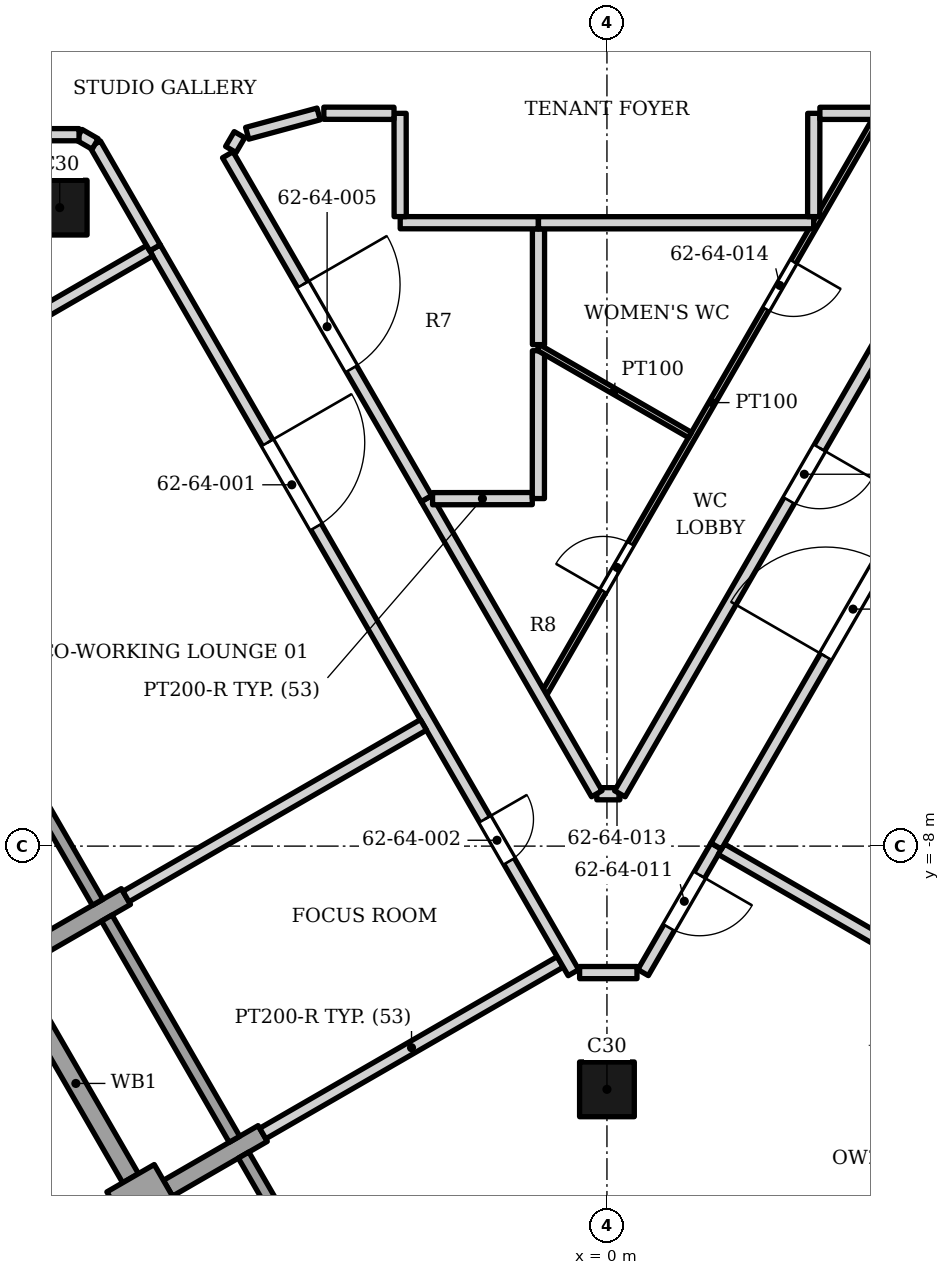
"""IFC4 building model, lengths in metres.
Left out: names, types, materials, properties, quantities, classifications, styles, units other than length and angle.
Written with IfcOpenShell. Run it as: python <this file> out.ifc"""

import sys

from ifc_helpers import new_model, si_unit, direction, frame, frame_2d, origin, origin_2d, place, context, subcontext, project, spatial, rectangle, extrude, element, fill, save


model = new_model("IFC4")
c1 = context("Model", 3, precision=1e-05, world=origin(), true_north=direction((0.0, 1.0)))
c2 = subcontext(c1, "Body", "Model", "MODEL_VIEW")
j1 = project(units=[si_unit("LENGTHUNIT", "METRE"), si_unit("PLANEANGLEUNIT", "RADIAN")], contexts=[c1])
p1 = place(None, origin())
s1 = spatial("IfcSite", under=j1, at=p1, CompositionType="ELEMENT")
p2 = place(p1, origin())
s2 = spatial("IfcBuilding", under=s1, at=p2, CompositionType="ELEMENT")
p3 = place(p2, frame((0.0, 0.0, 259.9)))
s3 = spatial("IfcBuildingStorey", under=s2, at=p3, CompositionType="ELEMENT", Elevation=259.9)
for number, where, z_axis, x_axis in (
    (1, (-9.0, 2.5, 0.0), (0.0, 0.0, 1.0), (1.0, 0.0, 0.0)),
    (2, (0.0, -12.0, 0.0), (0.0, 0.0, 1.0), (1.0, 0.0, 0.0)),
):
    element("IfcColumn", number, at=place(p3, frame(where, z_axis=z_axis, x_axis=x_axis)), inside=s3, PredefinedType="COLUMN", context=c2, shape_type="SweptSolid", body=[
        extrude(rectangle(XDim=0.9, YDim=0.9, at=origin_2d()), origin(), (0.0, 0.0, 1.0), 3.9),
    ])
p4 = place(p3, frame((-7.911, -8.829, 0.0), z_axis=(0.0, 0.0, 1.0), x_axis=(-0.866047807691, -0.499961193289, 0.0)))
e3 = element("IfcWall", 3, at=p4, inside=s3, PredefinedType="SOLIDWALL", context=c2, shape_type="SweptSolid", body=[
    extrude(rectangle(XDim=1.8, YDim=0.3, at=frame_2d((0.9, 0.0))), origin(), (0.0, 0.0, 1.0), 3.0),
])
p5 = place(p3, frame((-7.999, -14.076, 0.0), z_axis=(0.0, 0.0, 1.0), x_axis=(0.866081705922, 0.499902469156, 0.0)))
e4 = element("IfcWall", 4, at=p5, inside=s3, PredefinedType="SOLIDWALL", context=c2, shape_type="SweptSolid", body=[
    extrude(rectangle(XDim=0.9, YDim=0.9, at=frame_2d((0.45, 0.0))), origin(), (0.0, 0.0, 1.0), 3.0),
])
p6 = place(p3, frame((-7.22, -13.626, 0.0), z_axis=(0.0, 0.0, 1.0), x_axis=(0.866047807691, 0.499961193289, 0.0)))
e5 = element("IfcWall", 5, at=p6, inside=s3, PredefinedType="SOLIDWALL", context=c2, shape_type="SweptSolid", body=[
    extrude(rectangle(XDim=1.8, YDim=0.3, at=frame_2d((0.9, 0.0))), origin(), (0.0, 0.0, 1.0), 3.0),
])
p7 = place(p3, frame((-10.476, -5.287, 0.0), z_axis=(0.0, 0.0, 1.0), x_axis=(0.49998411664, -0.866034573852, 0.0)))
e6 = element("IfcWall", 6, at=p7, inside=s3, PredefinedType="ELEMENTEDWALL", context=c2, shape_type="SweptSolid", body=[
    extrude(rectangle(XDim=4.2, YDim=0.2, at=frame_2d((2.1, 0.0))), origin(), (0.0, 0.0, 1.0), 3.0),
])
p8 = place(p3, frame((-9.635, -10.344, 0.0), z_axis=(0.0, 0.0, 1.0), x_axis=(0.500012057535, -0.866018442252, 0.0)))
e7 = element("IfcWall", 7, at=p8, inside=s3, PredefinedType="SOLIDWALL", context=c2, shape_type="SweptSolid", body=[
    extrude(rectangle(XDim=3.6, YDim=0.3, at=frame_2d((1.8, 0.0))), origin(), (0.0, 0.0, 1.0), 2.95),
])
p9 = place(p3, frame((-8.226, -9.184, 0.0), z_axis=(0.0, 0.0, 1.0), x_axis=(0.49998411664, -0.866034573852, 0.0)))
e8 = element("IfcWall", 8, at=p9, inside=s3, PredefinedType="ELEMENTEDWALL", context=c2, shape_type="SweptSolid", body=[
    extrude(rectangle(XDim=4.2, YDim=0.2, at=frame_2d((2.1, 0.0))), origin(), (0.0, 0.0, 1.0), 2.95),
])
p10 = place(p3, frame((-5.976, -13.081, 0.0), z_axis=(0.0, 0.0, 1.0), x_axis=(0.499958946799, -0.866049104564, 0.0)))
e9 = element("IfcWall", 9, at=p10, inside=s3, PredefinedType="ELEMENTEDWALL", context=c2, shape_type="SweptSolid", body=[
    extrude(rectangle(XDim=4.2, YDim=0.2, at=frame_2d((2.1, 0.0))), origin(), (0.0, 0.0, 1.0), 3.0),
])
p11 = place(p3, frame((-5.661, -12.727, 0.0), z_axis=(0.0, 0.0, 1.0), x_axis=(0.866171915947, 0.499746147583, 0.0)))
e10 = element("IfcWall", 10, at=p11, inside=s3, PredefinedType="PARTITIONING", context=c2, shape_type="SweptSolid", body=[
    extrude(rectangle(XDim=5.649, YDim=0.2, at=frame_2d((2.825, 0.0))), origin(), (0.0, 0.0, 1.0), 2.884),
])
p12 = place(p3, frame((-7.433, 1.839, 0.0), z_axis=(0.0, 0.0, 1.0), x_axis=(0.500005992518, -0.866021943975, 0.0)))
e11 = element("IfcWall", 11, at=p12, inside=s3, PredefinedType="PARTITIONING", context=c2, shape_type="SweptSolid", body=[
    extrude(rectangle(XDim=13.764, YDim=0.2, at=frame_2d((6.882, 0.0))), origin(), (0.0, 0.0, 1.0), 2.884),
])
p13 = place(p12, frame((3.7, 0.0, 0.0)))
e12 = element("IfcOpeningElement", 12, at=p13, cuts=e11, PredefinedType="OPENING", context=c2, shape_type="SweptSolid", body=[
    extrude(rectangle(XDim=1.6, YDim=2.1, at=frame_2d((0.8, 1.05))), frame((0.0, 0.11, 0.0), z_axis=(0.0, -1.0, 0.0), x_axis=(1.0, 0.0, 0.0)), (0.0, 0.0, 1.0), 0.22),
])
p14 = place(p12, frame((10.85, 0.0, 0.0)))
e13 = element("IfcOpeningElement", 13, at=p14, cuts=e11, PredefinedType="OPENING", context=c2, shape_type="SweptSolid", body=[
    extrude(rectangle(XDim=0.8, YDim=2.1, at=frame_2d((0.4, 1.05))), frame((0.0, 0.11, 0.0), z_axis=(0.0, -1.0, 0.0), x_axis=(1.0, 0.0, 0.0)), (0.0, 0.0, 1.0), 0.22),
])
p15 = place(p3, frame((-0.449, -10.08, 0.0), z_axis=(0.0, 0.0, 1.0), x_axis=(0.999999966511, 0.000258799163, 0.0)))
e14 = element("IfcWall", 14, at=p15, inside=s3, PredefinedType="PARTITIONING", context=c2, shape_type="SweptSolid", body=[
    extrude(rectangle(XDim=0.943, YDim=0.2, at=frame_2d((0.472, 0.0))), origin(), (0.0, 0.0, 1.0), 3.73),
])
p16 = place(p3, frame((0.594, -10.08, 0.0), z_axis=(0.0, 0.0, 1.0), x_axis=(0.500575540498, 0.865692860231, 0.0)))
e15 = element("IfcWall", 15, at=p16, inside=s3, PredefinedType="PARTITIONING", context=c2, shape_type="SweptSolid", body=[
    extrude(rectangle(XDim=2.403, YDim=0.2, at=frame_2d((1.201, 0.0))), origin(), (0.0, 0.0, 1.0), 3.73),
])
p17 = place(p16, frame((0.854, 0.0, 0.0)))
e16 = element("IfcOpeningElement", 16, at=p17, cuts=e15, PredefinedType="OPENING", context=c2, shape_type="SweptSolid", body=[
    extrude(rectangle(XDim=1.0, YDim=2.1, at=frame_2d((0.5, 1.05))), frame((0.0, 0.11, 0.0), z_axis=(0.0, -1.0, 0.0), x_axis=(1.0, 0.0, 0.0)), (0.0, 0.0, 1.0), 0.22),
])
p18 = place(p3, frame((1.881, -8.05, 0.0), z_axis=(0.0, 0.0, 1.0), x_axis=(0.86614736797, -0.499788692307, 0.0)))
e17 = element("IfcWall", 17, at=p18, inside=s3, PredefinedType="PARTITIONING", context=c2, shape_type="SweptSolid", body=[
    extrude(rectangle(XDim=5.85, YDim=0.2, at=frame_2d((2.925, 0.0))), origin(), (0.0, 0.0, 1.0), 2.884),
])
p19 = place(p3, frame((-0.167, -7.138, 0.0), z_axis=(0.0, 0.0, 1.0), x_axis=(0.999996687272, -0.002573994047, 0.0)))
e18 = element("IfcWall", 18, at=p19, inside=s3, PredefinedType="PARTITIONING", context=c2, shape_type="SweptSolid", body=[
    extrude(rectangle(XDim=0.379, YDim=0.2, at=frame_2d((0.19, 0.0))), origin(), (0.0, 0.0, 1.0), 3.73),
])
p20 = place(p3, frame((0.212, -7.139, 0.0), z_axis=(0.0, 0.0, 1.0), x_axis=(0.499990649477, 0.866030802244, 0.0)))
e19 = element("IfcWall", 19, at=p20, inside=s3, PredefinedType="PARTITIONING", context=c2, shape_type="SweptSolid", body=[
    extrude(rectangle(XDim=12.135, YDim=0.2, at=frame_2d((6.067, 0.0))), origin(), (0.0, 0.0, 1.0), 2.884),
])
p21 = place(p20, frame((5.567, 0.0, 0.0)))
e20 = element("IfcOpeningElement", 20, at=p21, cuts=e19, PredefinedType="OPENING", context=c2, shape_type="SweptSolid", body=[
    extrude(rectangle(XDim=1.0, YDim=2.1, at=frame_2d((0.5, 1.05))), frame((0.0, 0.11, 0.0), z_axis=(0.0, -1.0, 0.0), x_axis=(1.0, 0.0, 0.0)), (0.0, 0.0, 1.0), 0.22),
])
p22 = place(p3, frame((-7.911, -8.829, 0.0), z_axis=(0.0, 0.0, 1.0), x_axis=(0.866174794958, 0.49974115758, 0.0)))
e21 = element("IfcWall", 21, at=p22, inside=s3, PredefinedType="PARTITIONING", context=c2, shape_type="SweptSolid", body=[
    extrude(rectangle(XDim=5.65, YDim=0.2, at=frame_2d((2.825, 0.0))), origin(), (0.0, 0.0, 1.0), 2.884),
])
p23 = place(p3, frame((-1.017, -5.465, 0.0), z_axis=(0.0, 0.0, 1.0), x_axis=(0.499983334908, 0.866035025166, 0.0)))
e22 = element("IfcWall", 22, at=p23, inside=s3, PredefinedType="PARTITIONING", context=c2, shape_type="SweptSolid", body=[
    extrude(rectangle(XDim=10.99, YDim=0.1, at=frame_2d((5.495, 0.0))), origin(), (0.0, 0.0, 1.0), 2.884),
])
p24 = place(p23, frame((1.915, 0.0, 0.0)))
e23 = element("IfcOpeningElement", 23, at=p24, cuts=e22, PredefinedType="OPENING", context=c2, shape_type="SweptSolid", body=[
    extrude(rectangle(XDim=0.9, YDim=2.1, at=frame_2d((0.45, 1.05))), frame((0.0, 0.06, 0.0), z_axis=(0.0, -1.0, 0.0), x_axis=(1.0, 0.0, 0.0)), (0.0, 0.0, 1.0), 0.12),
])
p25 = place(p23, frame((7.271, 0.0, 0.0)))
e24 = element("IfcOpeningElement", 24, at=p25, cuts=e22, PredefinedType="OPENING", context=c2, shape_type="SweptSolid", body=[
    extrude(rectangle(XDim=0.9, YDim=2.1, at=frame_2d((0.45, 1.05))), frame((0.0, 0.06, 0.0), z_axis=(0.0, -1.0, 0.0), x_axis=(1.0, 0.0, 0.0)), (0.0, 0.0, 1.0), 0.12),
])
p26 = place(p3, frame((-2.968, -2.287, 0.0), z_axis=(0.0, 0.0, 1.0), x_axis=(0.499996582779, -0.866027376709, 0.0)))
e25 = element("IfcWall", 25, at=p26, inside=s3, PredefinedType="PARTITIONING", context=c2, shape_type="SweptSolid", body=[
    extrude(rectangle(XDim=5.602, YDim=0.2, at=frame_2d((2.801, 0.0))), origin(), (0.0, 0.0, 1.0), 2.884),
])
p27 = place(p3, frame((-2.868, -2.286, 0.0), z_axis=(0.0, 0.0, 1.0), x_axis=(0.999999601047, 0.000893255561, 0.0)))
e26 = element("IfcWall", 26, at=p27, inside=s3, PredefinedType="PARTITIONING", context=c2, shape_type="SweptSolid", body=[
    extrude(rectangle(XDim=1.64, YDim=0.2, at=frame_2d((0.82, 0.0))), origin(), (0.0, 0.0, 1.0), 3.73),
])
p28 = place(p3, frame((-12.411, -1.034, 0.0), z_axis=(0.0, 0.0, 1.0), x_axis=(0.865901262238, 0.500214957848, 0.0)))
e27 = element("IfcWall", 27, at=p28, inside=s3, PredefinedType="PARTITIONING", context=c2, shape_type="SweptSolid", body=[
    extrude(rectangle(XDim=5.649, YDim=0.2, at=frame_2d((2.825, 0.0))), origin(), (0.0, 0.0, 1.0), 3.052),
])
p29 = place(p3, frame((1.797, -7.999, 0.0), z_axis=(0.0, 0.0, 1.0), x_axis=(0.5000018851, 0.866024315419, 0.0)))
e28 = element("IfcWall", 28, at=p29, inside=s3, PredefinedType="PARTITIONING", context=c2, shape_type="SweptSolid", body=[
    extrude(rectangle(XDim=9.0, YDim=0.2, at=frame_2d((4.5, 0.0))), origin(), (0.0, 0.0, 1.0), 2.884),
])
p30 = place(p29, frame((3.6, 0.0, 0.0)))
e29 = element("IfcOpeningElement", 29, at=p30, cuts=e28, PredefinedType="OPENING", context=c2, shape_type="SweptSolid", body=[
    extrude(rectangle(XDim=1.8, YDim=2.4, at=frame_2d((0.9, 1.2))), frame((0.0, 0.11, 0.0), z_axis=(0.0, -1.0, 0.0), x_axis=(1.0, 0.0, 0.0)), (0.0, 0.0, 1.0), 0.22),
])
p31 = place(p3, frame((-1.128, -2.285, 0.0), z_axis=(0.0, 0.0, 1.0), x_axis=(0.000803212592, 0.999999677425, 0.0)))
e30 = element("IfcWall", 30, at=p31, inside=s3, PredefinedType="PARTITIONING", context=c2, shape_type="SweptSolid", body=[
    extrude(rectangle(XDim=2.432, YDim=0.2, at=frame_2d((1.216, 0.0))), origin(), (0.0, 0.0, 1.0), 3.73),
])
p32 = place(p3, frame((-1.128, 0.2, 0.0), z_axis=(0.0, 0.0, 1.0), x_axis=(0.866037287897, -0.499979415547, 0.0)))
e31 = element("IfcWall", 31, at=p32, inside=s3, PredefinedType="PARTITIONING", context=c2, shape_type="SweptSolid", body=[
    extrude(rectangle(XDim=2.878, YDim=0.1, at=frame_2d((1.439, 0.0))), origin(), (0.0, 0.0, 1.0), 2.884),
])
p33 = place(p3, frame((-8.417, 3.546, 0.0), z_axis=(0.0, 0.0, 1.0), x_axis=(0.499325430766, -0.866414516378, 0.0)))
e32 = element("IfcWall", 32, at=p33, inside=s3, PredefinedType="PARTITIONING", context=c2, shape_type="SweptSolid", body=[
    extrude(rectangle(XDim=1.97, YDim=0.2, at=frame_2d((0.985, 0.0))), origin(), (0.0, 0.0, 1.0), 3.73),
])
p34 = place(p3, frame((-1.126, 0.247, 0.0), z_axis=(0.0, 0.0, 1.0), x_axis=(0.0, 1.0, 0.0)))
e33 = element("IfcWall", 33, at=p34, inside=s3, PredefinedType="PARTITIONING", context=c2, shape_type="SweptSolid", body=[
    extrude(rectangle(XDim=1.903, YDim=0.2, at=frame_2d((0.952, 0.0))), origin(), (0.0, 0.0, 1.0), 3.73),
])
p35 = place(p3, frame((-3.4, 2.252, 0.0), z_axis=(0.0, 0.0, 1.0), x_axis=(0.999999630572, -0.000859567749, 0.0)))
e34 = element("IfcWall", 34, at=p35, inside=s3, PredefinedType="PARTITIONING", context=c2, shape_type="SweptSolid", body=[
    extrude(rectangle(XDim=2.272, YDim=0.2, at=frame_2d((1.136, 0.0))), origin(), (0.0, 0.0, 1.0), 3.73),
])
p36 = place(p3, frame((-1.126, 2.25, 0.0), z_axis=(0.0, 0.0, 1.0), x_axis=(0.999999906884, 0.000431545973, 0.0)))
e35 = element("IfcWall", 35, at=p36, inside=s3, PredefinedType="PARTITIONING", context=c2, shape_type="SweptSolid", body=[
    extrude(rectangle(XDim=4.526, YDim=0.2, at=frame_2d((2.263, 0.0))), origin(), (0.0, 0.0, 1.0), 3.73),
])
p37 = place(p3, frame((-3.402, 4.051, 0.0), z_axis=(0.0, 0.0, 1.0), x_axis=(0.001150085496, -0.999999338651, 0.0)))
e36 = element("IfcWall", 36, at=p37, inside=s3, PredefinedType="PARTITIONING", context=c2, shape_type="SweptSolid", body=[
    extrude(rectangle(XDim=1.698, YDim=0.2, at=frame_2d((0.849, 0.0))), origin(), (0.0, 0.0, 1.0), 3.73),
])
p38 = place(p3, frame((-6.236, 3.37, 0.0), z_axis=(0.0, 0.0, 1.0), x_axis=(0.500224030226, -0.865896021231, 0.0)))
e37 = element("IfcWall", 37, at=p38, inside=s3, PredefinedType="PARTITIONING", context=c2, shape_type="SweptSolid", body=[
    extrude(rectangle(XDim=6.53, YDim=0.2, at=frame_2d((3.265, 0.0))), origin(), (0.0, 0.0, 1.0), 2.884),
])
p39 = place(p38, frame((2.466, 0.0, 0.0)))
e38 = element("IfcOpeningElement", 38, at=p39, cuts=e37, PredefinedType="OPENING", context=c2, shape_type="SweptSolid", body=[
    extrude(rectangle(XDim=1.6, YDim=2.1, at=frame_2d((0.8, 1.05))), frame((0.0, 0.11, 0.0), z_axis=(0.0, -1.0, 0.0), x_axis=(1.0, 0.0, 0.0)), (0.0, 0.0, 1.0), 0.22),
])
p40 = place(p3, frame((-8.682, 3.699, 0.0), z_axis=(0.0, 0.0, 1.0), x_axis=(0.866026229868, -0.499998569178, 0.0)))
e39 = element("IfcWall", 39, at=p40, inside=s3, PredefinedType="PARTITIONING", context=c2, shape_type="SweptSolid", body=[
    extrude(rectangle(XDim=0.306, YDim=0.2, at=frame_2d((0.153, 0.0))), origin(), (0.0, 0.0, 1.0), 3.73),
])
p41 = place(p3, frame((-14.24, 3.7, 0.0), z_axis=(0.0, 0.0, 1.0), x_axis=(0.999999999035, -4.3925151e-05, 0.0)))
e40 = element("IfcWall", 40, at=p41, inside=s3, PredefinedType="PARTITIONING", context=c2, shape_type="SweptSolid", body=[
    extrude(rectangle(XDim=5.558, YDim=0.2, at=frame_2d((2.779, 0.0))), origin(), (0.0, 0.0, 1.0), 3.73),
])
p42 = place(p41, frame((1.979, 0.0, 0.0)))
e41 = element("IfcOpeningElement", 41, at=p42, cuts=e40, PredefinedType="OPENING", context=c2, shape_type="SweptSolid", body=[
    extrude(rectangle(XDim=1.6, YDim=2.1, at=frame_2d((0.8, 1.05))), frame((0.0, 0.11, 0.0), z_axis=(0.0, -1.0, 0.0), x_axis=(1.0, 0.0, 0.0)), (0.0, 0.0, 1.0), 0.22),
])
p43 = place(p3, frame((-6.186, 3.456, 0.0), z_axis=(0.0, 0.0, 1.0), x_axis=(0.504408873088, 0.863464931975, 0.0)))
e42 = element("IfcWall", 42, at=p43, inside=s3, PredefinedType="PARTITIONING", context=c2, shape_type="SweptSolid", body=[
    extrude(rectangle(XDim=0.282, YDim=0.2, at=frame_2d((0.141, 0.0))), origin(), (0.0, 0.0, 1.0), 3.73),
])
p44 = place(p3, frame((-5.917, 3.723, 0.0), z_axis=(0.0, 0.0, 1.0), x_axis=(0.965160943547, 0.26165693771, 0.0)))
e43 = element("IfcWall", 43, at=p44, inside=s3, PredefinedType="PARTITIONING", context=c2, shape_type="SweptSolid", body=[
    extrude(rectangle(XDim=1.217, YDim=0.2, at=frame_2d((0.608, 0.0))), origin(), (0.0, 0.0, 1.0), 2.884),
])
p45 = place(p3, frame((-4.656, 4.052, 0.0), z_axis=(0.0, 0.0, 1.0), x_axis=(0.999998904, -0.001480539832, 0.0)))
e44 = element("IfcWall", 44, at=p45, inside=s3, PredefinedType="PARTITIONING", context=c2, shape_type="SweptSolid", body=[
    extrude(rectangle(XDim=1.154, YDim=0.2, at=frame_2d((0.577, 0.0))), origin(), (0.0, 0.0, 1.0), 3.73),
])
p46 = place(p3, frame((3.4, 2.352, 0.0), z_axis=(0.0, 0.0, 1.0), x_axis=(0.001150085496, 0.999999338651, 0.0)))
e45 = element("IfcWall", 45, at=p46, inside=s3, PredefinedType="PARTITIONING", context=c2, shape_type="SweptSolid", body=[
    extrude(rectangle(XDim=1.698, YDim=0.2, at=frame_2d((0.849, 0.0))), origin(), (0.0, 0.0, 1.0), 3.73),
])
p47 = place(p3, frame((3.502, 4.051, 0.0), z_axis=(0.0, 0.0, 1.0), x_axis=(1.0, 0.0, 0.0)))
e46 = element("IfcWall", 46, at=p47, inside=s3, PredefinedType="PARTITIONING", context=c2, shape_type="SweptSolid", body=[
    extrude(rectangle(XDim=0.927, YDim=0.2, at=frame_2d((0.463, 0.0))), origin(), (0.0, 0.0, 1.0), 2.884),
])
p48 = place(p13, origin())
e47 = element("IfcDoor", 47, at=p48, inside=s3, OperationType="DOUBLE_DOOR_SINGLE_SWING", PredefinedType="DOOR", context=c2, shape_type="SweptSolid", body=[
    extrude(rectangle(XDim=1.6, YDim=2.1, at=frame_2d((0.8, 1.05))), frame((0.0, 0.025, 0.0), z_axis=(0.0, -1.0, 0.0), x_axis=(1.0, 0.0, 0.0)), (0.0, 0.0, 1.0), 0.05),
])
fill(e12, e47)
p49 = place(p14, origin())
e48 = element("IfcDoor", 48, at=p49, inside=s3, OperationType="SINGLE_SWING_LEFT", PredefinedType="DOOR", context=c2, shape_type="SweptSolid", body=[
    extrude(rectangle(XDim=0.8, YDim=2.1, at=frame_2d((0.4, 1.05))), frame((0.0, 0.025, 0.0), z_axis=(0.0, -1.0, 0.0), x_axis=(1.0, 0.0, 0.0)), (0.0, 0.0, 1.0), 0.05),
])
fill(e13, e48)
p50 = place(p30, origin())
e49 = element("IfcDoor", 49, at=p50, inside=s3, OperationType="DOUBLE_DOOR_SINGLE_SWING", PredefinedType="DOOR", context=c2, shape_type="SweptSolid", body=[
    extrude(rectangle(XDim=1.8, YDim=2.4, at=frame_2d((0.9, 1.2))), frame((0.0, 0.025, 0.0), z_axis=(0.0, -1.0, 0.0), x_axis=(1.0, 0.0, 0.0)), (0.0, 0.0, 1.0), 0.05),
])
fill(e29, e49)
p51 = place(p39, origin())
e50 = element("IfcDoor", 50, at=p51, inside=s3, OperationType="DOUBLE_DOOR_SINGLE_SWING", PredefinedType="DOOR", context=c2, shape_type="SweptSolid", body=[
    extrude(rectangle(XDim=1.6, YDim=2.1, at=frame_2d((0.8, 1.05))), frame((0.0, 0.025, 0.0), z_axis=(0.0, -1.0, 0.0), x_axis=(1.0, 0.0, 0.0)), (0.0, 0.0, 1.0), 0.05),
])
fill(e38, e50)
p52 = place(p17, origin())
e51 = element("IfcDoor", 51, at=p52, inside=s3, OperationType="SINGLE_SWING_RIGHT", PredefinedType="DOOR", context=c2, shape_type="SweptSolid", body=[
    extrude(rectangle(XDim=1.0, YDim=2.1, at=frame_2d((0.5, 1.05))), frame((0.0, 0.025, 0.0), z_axis=(0.0, -1.0, 0.0), x_axis=(1.0, 0.0, 0.0)), (0.0, 0.0, 1.0), 0.05),
])
fill(e16, e51)
p53 = place(p21, origin())
e52 = element("IfcDoor", 52, at=p53, inside=s3, OperationType="SINGLE_SWING_RIGHT", PredefinedType="DOOR", context=c2, shape_type="SweptSolid", body=[
    extrude(rectangle(XDim=1.0, YDim=2.1, at=frame_2d((0.5, 1.05))), frame((0.0, 0.025, 0.0), z_axis=(0.0, -1.0, 0.0), x_axis=(1.0, 0.0, 0.0)), (0.0, 0.0, 1.0), 0.05),
])
fill(e20, e52)
p54 = place(p24, origin())
e53 = element("IfcDoor", 53, at=p54, inside=s3, OperationType="SINGLE_SWING_LEFT", PredefinedType="DOOR", context=c2, shape_type="SweptSolid", body=[
    extrude(rectangle(XDim=0.9, YDim=2.1, at=frame_2d((0.45, 1.05))), frame((0.0, 0.025, 0.0), z_axis=(0.0, -1.0, 0.0), x_axis=(1.0, 0.0, 0.0)), (0.0, 0.0, 1.0), 0.05),
])
fill(e23, e53)
p55 = place(p25, origin())
e54 = element("IfcDoor", 54, at=p55, inside=s3, OperationType="SINGLE_SWING_RIGHT", PredefinedType="DOOR", context=c2, shape_type="SweptSolid", body=[
    extrude(rectangle(XDim=0.9, YDim=2.1, at=frame_2d((0.45, 1.05))), frame((0.0, 0.025, 0.0), z_axis=(0.0, -1.0, 0.0), x_axis=(1.0, 0.0, 0.0)), (0.0, 0.0, 1.0), 0.05),
])
fill(e24, e54)
save(model, sys.argv[1])
